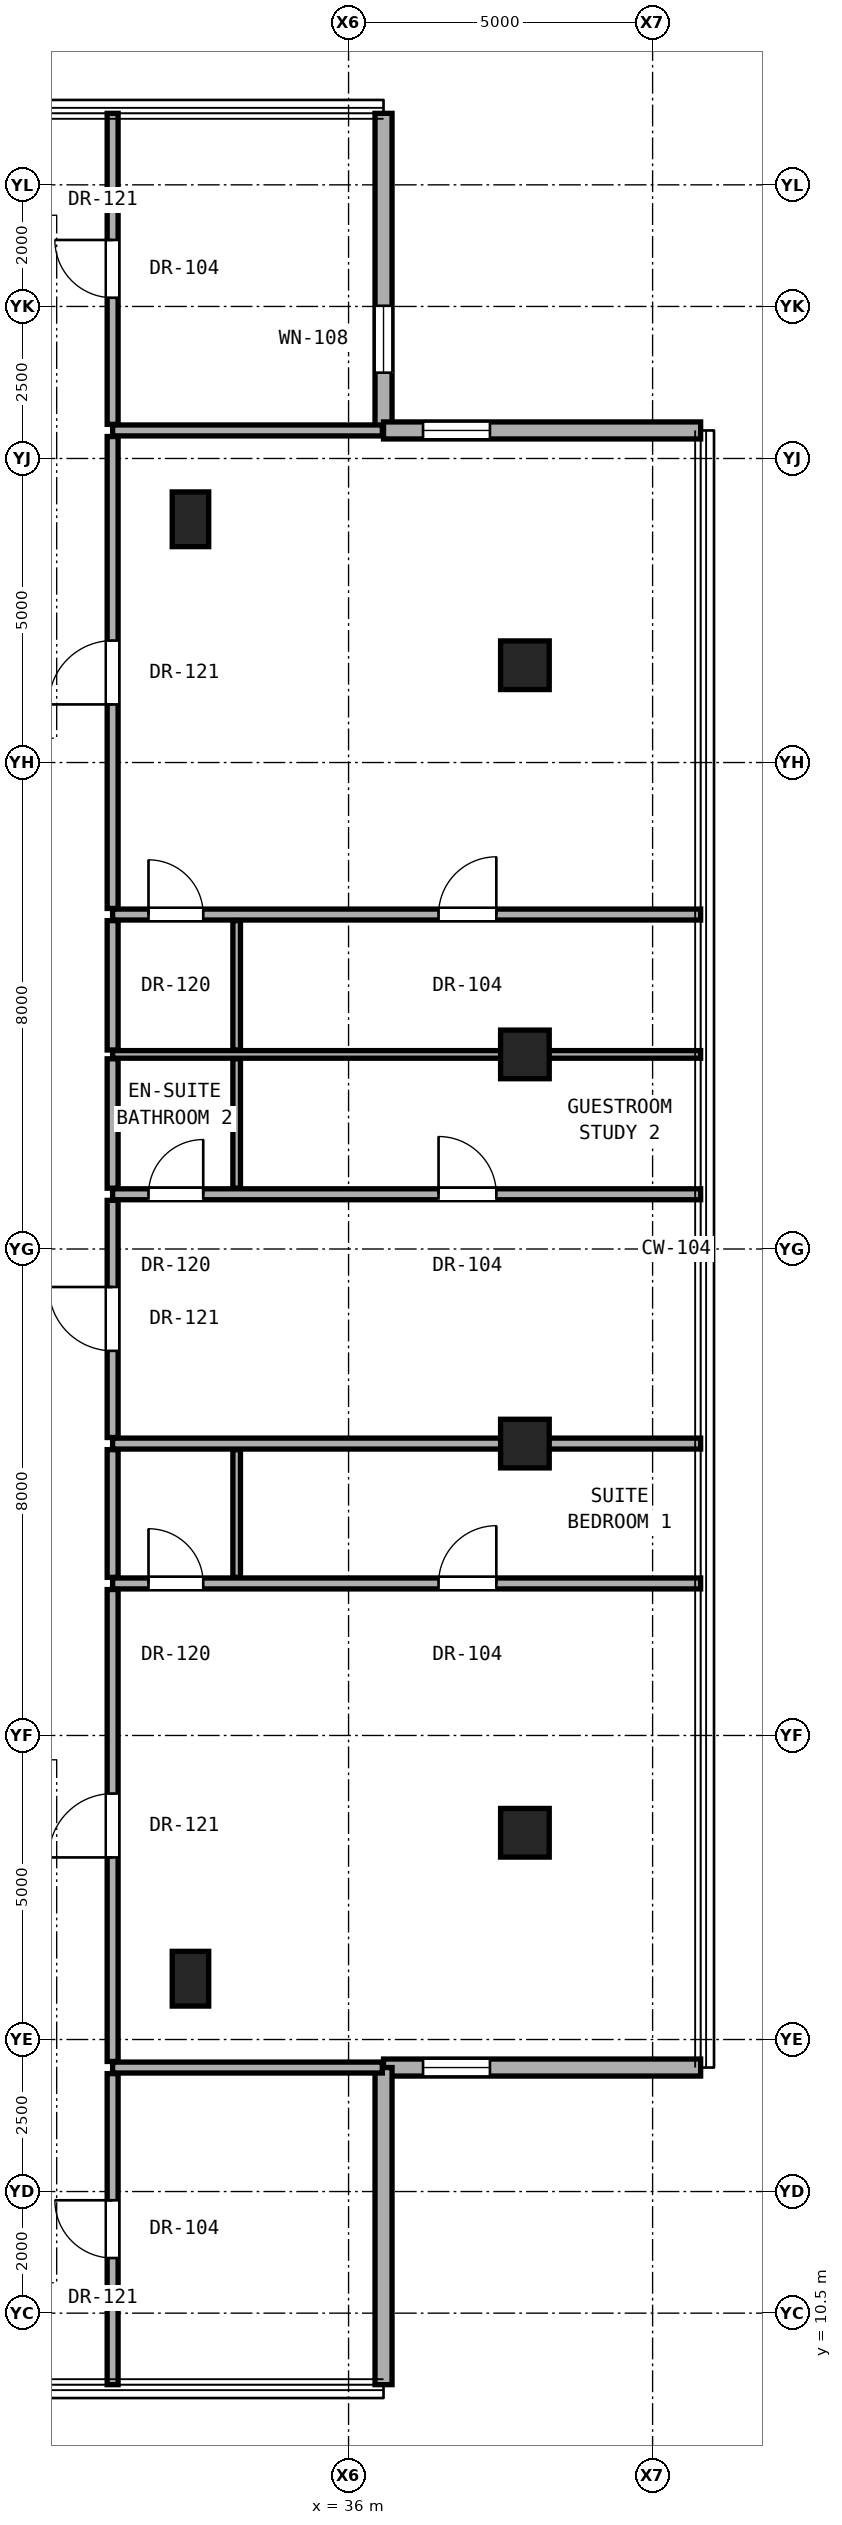
"""IFC4 building model, lengths in metres.
Left out: names, types, materials, properties, quantities, classifications, styles, units other than length and angle.
Written with IfcOpenShell. Run it as: python <this file> out.ifc"""

import sys

from ifc_helpers import new_model, si_unit, direction, frame, frame_2d, origin, origin_2d, place, context, subcontext, project, spatial, rectangle, hollow_rectangle, extrude, element, fill, save


model = new_model("IFC4")
c1 = context("Model", 3, precision=1e-05, world=origin(), true_north=direction((0.0, 1.0)))
c2 = subcontext(c1, "Body", "Model", "MODEL_VIEW")
j1 = project(units=[si_unit("LENGTHUNIT", "METRE"), si_unit("PLANEANGLEUNIT", "RADIAN")], contexts=[c1])
p1 = place(None, origin())
s1 = spatial("IfcSite", under=j1, at=p1, CompositionType="ELEMENT")
p2 = place(p1, origin())
s2 = spatial("IfcBuilding", under=s1, at=p2, CompositionType="ELEMENT")
p3 = place(p2, frame((0.0, 0.0, 206.4)))
s3 = spatial("IfcBuildingStorey", under=s2, at=p3, CompositionType="ELEMENT", Elevation=206.4)
for number, where, z_axis, x_axis in (
    (1, (38.9, 18.4, 0.0), (0.0, 0.0, 1.0), (1.0, 0.0, 0.0)),
    (2, (38.9, 24.8, 0.0), (0.0, 0.0, 1.0), (1.0, 0.0, 0.0)),
    (3, (38.9, 31.2, 0.0), (0.0, 0.0, 1.0), (1.0, 0.0, 0.0)),
    (4, (38.9, 37.6, 0.0), (0.0, 0.0, 1.0), (1.0, 0.0, 0.0)),
):
    element("IfcColumn", number, at=place(p3, frame(where, z_axis=z_axis, x_axis=x_axis)), inside=s3, PredefinedType="COLUMN", context=c2, shape_type="SweptSolid", body=[
        extrude(hollow_rectangle(XDim=0.8, YDim=0.8, WallThickness=0.045, at=origin_2d()), origin(), (0.0, 0.0, 1.0), 3.25),
    ])
for number, where, z_axis, x_axis in (
    (5, (33.4, 16.0, 0.0), (0.0, 0.0, 1.0), (1.0, 0.0, 0.0)),
    (6, (33.4, 40.0, 0.0), (0.0, 0.0, 1.0), (1.0, 0.0, 0.0)),
):
    element("IfcColumn", number, at=place(p3, frame(where, z_axis=z_axis, x_axis=x_axis)), inside=s3, PredefinedType="PILASTER", context=c2, shape_type="SweptSolid", body=[
        extrude(rectangle(XDim=0.6, YDim=0.9, at=origin_2d()), origin(), (0.0, 0.0, 1.0), 3.25),
    ])
p4 = place(p3, frame((36.575, 41.461, 0.0), z_axis=(0.0, 0.0, 1.0), x_axis=(0.0, 1.0, 0.0)))
e7 = element("IfcWall", 7, at=p4, inside=s3, PredefinedType="SOLIDWALL", context=c2, shape_type="SweptSolid", body=[
    extrude(rectangle(XDim=5.215, YDim=0.28, at=frame_2d((2.607, 0.0))), origin(), (0.0, 0.0, 1.0), 3.03),
])
p5 = place(p4, frame((0.95, 0.0, 0.85)))
e8 = element("IfcOpeningElement", 8, at=p5, cuts=e7, PredefinedType="OPENING", context=c2, shape_type="SweptSolid", body=[
    extrude(rectangle(XDim=1.1, YDim=2.0, at=frame_2d((0.55, 1.0))), frame((0.0, 0.15, 0.0), z_axis=(0.0, -1.0, 0.0), x_axis=(1.0, 0.0, 0.0)), (0.0, 0.0, 1.0), 0.3),
])
p6 = place(p3, frame((36.575, 14.539, 0.0), z_axis=(0.0, 0.0, 1.0), x_axis=(1.0, 0.0, 0.0)))
e9 = element("IfcWall", 9, at=p6, inside=s3, PredefinedType="SOLIDWALL", context=c2, shape_type="SweptSolid", body=[
    extrude(rectangle(XDim=5.215, YDim=0.28, at=frame_2d((2.607, 0.0))), origin(), (0.0, 0.0, 1.0), 3.03),
])
p7 = place(p6, frame((0.65, 0.0, 0.85)))
e10 = element("IfcOpeningElement", 10, at=p7, cuts=e9, PredefinedType="OPENING", context=c2, shape_type="SweptSolid", body=[
    extrude(rectangle(XDim=1.1, YDim=2.0, at=frame_2d((0.55, 1.0))), frame((0.0, 0.15, 0.0), z_axis=(0.0, -1.0, 0.0), x_axis=(1.0, 0.0, 0.0)), (0.0, 0.0, 1.0), 0.3),
])
p8 = place(p3, frame((36.575, 9.324, 0.0), z_axis=(0.0, 0.0, 1.0), x_axis=(0.0, 1.0, 0.0)))
e11 = element("IfcWall", 11, at=p8, inside=s3, PredefinedType="SOLIDWALL", context=c2, shape_type="SweptSolid", body=[
    extrude(rectangle(XDim=5.215, YDim=0.28, at=frame_2d((2.607, 0.0))), origin(), (0.0, 0.0, 1.0), 3.03),
])
p9 = place(p3, frame((41.79, 41.461, 0.0), z_axis=(0.0, 0.0, 1.0), x_axis=(-1.0, 0.0, 0.0)))
e12 = element("IfcWall", 12, at=p9, inside=s3, PredefinedType="SOLIDWALL", context=c2, shape_type="SweptSolid", body=[
    extrude(rectangle(XDim=5.215, YDim=0.28, at=frame_2d((2.607, 0.0))), origin(), (0.0, 0.0, 1.0), 3.03),
])
p10 = place(p9, frame((3.465, 0.0, 0.85)))
e13 = element("IfcOpeningElement", 13, at=p10, cuts=e12, PredefinedType="OPENING", context=c2, shape_type="SweptSolid", body=[
    extrude(rectangle(XDim=1.1, YDim=2.0, at=frame_2d((0.55, 1.0))), frame((0.0, 0.15, 0.0), z_axis=(0.0, -1.0, 0.0), x_axis=(1.0, 0.0, 0.0)), (0.0, 0.0, 1.0), 0.3),
])
p11 = place(p3, frame((32.12, 14.539, 0.0), z_axis=(0.0, 0.0, 1.0), x_axis=(1.0, 0.0, 0.0)))
e14 = element("IfcWall", 14, at=p11, inside=s3, PredefinedType="PARTITIONING", context=c2, shape_type="SweptSolid", body=[
    extrude(rectangle(XDim=4.435, YDim=0.18, at=frame_2d((2.217, 0.0))), origin(), (0.0, 0.0, 1.0), 3.05),
])
p12 = place(p3, frame((32.12, 22.5, 0.0), z_axis=(0.0, 0.0, 1.0), x_axis=(1.0, 0.0, 0.0)))
e15 = element("IfcWall", 15, at=p12, inside=s3, PredefinedType="PARTITIONING", context=c2, shape_type="SweptSolid", body=[
    extrude(rectangle(XDim=9.67, YDim=0.18, at=frame_2d((4.835, 0.0))), origin(), (0.0, 0.0, 1.0), 2.269),
])
p13 = place(p12, frame((5.36, 0.0, 0.0)))
e16 = element("IfcOpeningElement", 16, at=p13, cuts=e15, PredefinedType="OPENING", context=c2, shape_type="SweptSolid", body=[
    extrude(rectangle(XDim=0.95, YDim=2.15, at=frame_2d((0.475, 1.075))), frame((0.0, 0.1, 0.0), z_axis=(0.0, -1.0, 0.0), x_axis=(1.0, 0.0, 0.0)), (0.0, 0.0, 1.0), 0.2),
])
p14 = place(p12, frame((0.59, 0.0, 0.0)))
e17 = element("IfcOpeningElement", 17, at=p14, cuts=e15, PredefinedType="OPENING", context=c2, shape_type="SweptSolid", body=[
    extrude(rectangle(XDim=0.9, YDim=2.1, at=frame_2d((0.45, 1.05))), frame((0.0, 0.1, 0.0), z_axis=(0.0, -1.0, 0.0), x_axis=(1.0, 0.0, 0.0)), (0.0, 0.0, 1.0), 0.2),
])
p15 = place(p3, frame((32.12, 24.8, 0.0), z_axis=(0.0, 0.0, 1.0), x_axis=(1.0, 0.0, 0.0)))
e18 = element("IfcWall", 18, at=p15, inside=s3, PredefinedType="PARTITIONING", context=c2, shape_type="SweptSolid", body=[
    extrude(rectangle(XDim=9.67, YDim=0.18, at=frame_2d((4.835, 0.0))), origin(), (0.0, 0.0, 1.0), 2.269),
])
p16 = place(p3, frame((32.12, 28.9, 0.0), z_axis=(0.0, 0.0, 1.0), x_axis=(1.0, 0.0, 0.0)))
e19 = element("IfcWall", 19, at=p16, inside=s3, PredefinedType="PARTITIONING", context=c2, shape_type="SweptSolid", body=[
    extrude(rectangle(XDim=9.67, YDim=0.18, at=frame_2d((4.835, 0.0))), origin(), (0.0, 0.0, 1.0), 2.269),
])
p17 = place(p16, frame((5.36, 0.0, 0.0)))
e20 = element("IfcOpeningElement", 20, at=p17, cuts=e19, PredefinedType="OPENING", context=c2, shape_type="SweptSolid", body=[
    extrude(rectangle(XDim=0.95, YDim=2.15, at=frame_2d((0.475, 1.075))), frame((0.0, 0.1, 0.0), z_axis=(0.0, -1.0, 0.0), x_axis=(1.0, 0.0, 0.0)), (0.0, 0.0, 1.0), 0.2),
])
p18 = place(p16, frame((0.59, 0.0, 0.0)))
e21 = element("IfcOpeningElement", 21, at=p18, cuts=e19, PredefinedType="OPENING", context=c2, shape_type="SweptSolid", body=[
    extrude(rectangle(XDim=0.9, YDim=2.1, at=frame_2d((0.45, 1.05))), frame((0.0, 0.1, 0.0), z_axis=(0.0, -1.0, 0.0), x_axis=(1.0, 0.0, 0.0)), (0.0, 0.0, 1.0), 0.2),
])
p19 = place(p3, frame((32.12, 31.2, 0.0), z_axis=(0.0, 0.0, 1.0), x_axis=(1.0, 0.0, 0.0)))
e22 = element("IfcWall", 22, at=p19, inside=s3, PredefinedType="PARTITIONING", context=c2, shape_type="SweptSolid", body=[
    extrude(rectangle(XDim=9.67, YDim=0.125, at=frame_2d((4.835, 0.0))), origin(), (0.0, 0.0, 1.0), 2.269),
])
p20 = place(p3, frame((32.12, 33.5, 0.0), z_axis=(0.0, 0.0, 1.0), x_axis=(1.0, 0.0, 0.0)))
e23 = element("IfcWall", 23, at=p20, inside=s3, PredefinedType="PARTITIONING", context=c2, shape_type="SweptSolid", body=[
    extrude(rectangle(XDim=9.67, YDim=0.18, at=frame_2d((4.835, 0.0))), origin(), (0.0, 0.0, 1.0), 2.269),
])
p21 = place(p20, frame((5.36, 0.0, 0.0)))
e24 = element("IfcOpeningElement", 24, at=p21, cuts=e23, PredefinedType="OPENING", context=c2, shape_type="SweptSolid", body=[
    extrude(rectangle(XDim=0.95, YDim=2.15, at=frame_2d((0.475, 1.075))), frame((0.0, 0.1, 0.0), z_axis=(0.0, -1.0, 0.0), x_axis=(1.0, 0.0, 0.0)), (0.0, 0.0, 1.0), 0.2),
])
p22 = place(p20, frame((0.59, 0.0, 0.0)))
e25 = element("IfcOpeningElement", 25, at=p22, cuts=e23, PredefinedType="OPENING", context=c2, shape_type="SweptSolid", body=[
    extrude(rectangle(XDim=0.9, YDim=2.1, at=frame_2d((0.45, 1.05))), frame((0.0, 0.1, 0.0), z_axis=(0.0, -1.0, 0.0), x_axis=(1.0, 0.0, 0.0)), (0.0, 0.0, 1.0), 0.2),
])
p23 = place(p3, frame((32.12, 41.461, 0.0), z_axis=(0.0, 0.0, 1.0), x_axis=(1.0, 0.0, 0.0)))
e26 = element("IfcWall", 26, at=p23, inside=s3, PredefinedType="PARTITIONING", context=c2, shape_type="SweptSolid", body=[
    extrude(rectangle(XDim=4.435, YDim=0.18, at=frame_2d((2.217, 0.0))), origin(), (0.0, 0.0, 1.0), 3.05),
])
p24 = place(p3, frame((32.12, 9.324, 0.0), z_axis=(0.0, 0.0, 1.0), x_axis=(0.0, 1.0, 0.0)))
e27 = element("IfcWall", 27, at=p24, inside=s3, PredefinedType="PARTITIONING", context=c2, shape_type="SweptSolid", body=[
    extrude(rectangle(XDim=5.115, YDim=0.18, at=frame_2d((2.558, 0.0))), origin(), (0.0, 0.0, 1.0), 3.05),
])
p25 = place(p24, frame((2.083, 0.0, 0.0)))
e28 = element("IfcOpeningElement", 28, at=p25, cuts=e27, PredefinedType="OPENING", context=c2, shape_type="SweptSolid", body=[
    extrude(rectangle(XDim=0.95, YDim=2.15, at=frame_2d((0.475, 1.075))), frame((0.0, 0.1, 0.0), z_axis=(0.0, -1.0, 0.0), x_axis=(1.0, 0.0, 0.0)), (0.0, 0.0, 1.0), 0.2),
])
p26 = place(p3, frame((32.12, 14.639, 0.0), z_axis=(0.0, 0.0, 1.0), x_axis=(0.0, 1.0, 0.0)))
e29 = element("IfcWall", 29, at=p26, inside=s3, PredefinedType="PARTITIONING", context=c2, shape_type="SweptSolid", body=[
    extrude(rectangle(XDim=7.761, YDim=0.18, at=frame_2d((3.88, 0.0))), origin(), (0.0, 0.0, 1.0), 2.442),
])
p27 = place(p26, frame((3.355, 0.0, 0.0)))
e30 = element("IfcOpeningElement", 30, at=p27, cuts=e29, PredefinedType="OPENING", context=c2, shape_type="SweptSolid", body=[
    extrude(rectangle(XDim=1.05, YDim=2.2, at=frame_2d((0.525, 1.1))), frame((0.0, 0.1, 0.0), z_axis=(0.0, -1.0, 0.0), x_axis=(1.0, 0.0, 0.0)), (0.0, 0.0, 1.0), 0.2),
])
p28 = place(p3, frame((32.12, 22.6, 0.0), z_axis=(0.0, 0.0, 1.0), x_axis=(0.0, 1.0, 0.0)))
e31 = element("IfcWall", 31, at=p28, inside=s3, PredefinedType="PARTITIONING", context=c2, shape_type="SweptSolid", body=[
    extrude(rectangle(XDim=2.1, YDim=0.18, at=frame_2d((1.05, 0.0))), origin(), (0.0, 0.0, 1.0), 2.346),
])
p29 = place(p3, frame((32.12, 24.9, 0.0), z_axis=(0.0, 0.0, 1.0), x_axis=(0.0, 1.0, 0.0)))
e32 = element("IfcWall", 32, at=p29, inside=s3, PredefinedType="PARTITIONING", context=c2, shape_type="SweptSolid", body=[
    extrude(rectangle(XDim=3.9, YDim=0.18, at=frame_2d((1.95, 0.0))), origin(), (0.0, 0.0, 1.0), 2.346),
])
p30 = place(p29, frame((1.425, 0.0, 0.0)))
e33 = element("IfcOpeningElement", 33, at=p30, cuts=e32, PredefinedType="OPENING", context=c2, shape_type="SweptSolid", body=[
    extrude(rectangle(XDim=1.05, YDim=2.2, at=frame_2d((0.525, 1.1))), frame((0.0, 0.1, 0.0), z_axis=(0.0, -1.0, 0.0), x_axis=(1.0, 0.0, 0.0)), (0.0, 0.0, 1.0), 0.2),
])
for number, where, z_axis, x_axis in (
    (34, (32.12, 29.0, 0.0), (0.0, 0.0, 1.0), (0.0, 1.0, 0.0)),
    (35, (32.12, 31.272, 0.0), (0.0, 0.0, 1.0), (0.0, 1.0, 0.0)),
):
    element("IfcWall", number, at=place(p3, frame(where, z_axis=z_axis, x_axis=x_axis)), inside=s3, PredefinedType="PARTITIONING", context=c2, shape_type="SweptSolid", body=[
        extrude(rectangle(XDim=2.127, YDim=0.18, at=frame_2d((1.064, 0.0))), origin(), (0.0, 0.0, 1.0), 2.346),
    ])
p31 = place(p3, frame((32.12, 33.6, 0.0), z_axis=(0.0, 0.0, 1.0), x_axis=(0.0, 1.0, 0.0)))
e36 = element("IfcWall", 36, at=p31, inside=s3, PredefinedType="PARTITIONING", context=c2, shape_type="SweptSolid", body=[
    extrude(rectangle(XDim=7.761, YDim=0.18, at=frame_2d((3.88, 0.0))), origin(), (0.0, 0.0, 1.0), 2.442),
])
p32 = place(p31, frame((3.355, 0.0, 0.0)))
e37 = element("IfcOpeningElement", 37, at=p32, cuts=e36, PredefinedType="OPENING", context=c2, shape_type="SweptSolid", body=[
    extrude(rectangle(XDim=1.05, YDim=2.2, at=frame_2d((0.525, 1.1))), frame((0.0, 0.1, 0.0), z_axis=(0.0, -1.0, 0.0), x_axis=(1.0, 0.0, 0.0)), (0.0, 0.0, 1.0), 0.2),
])
p33 = place(p3, frame((32.12, 41.561, 0.0), z_axis=(0.0, 0.0, 1.0), x_axis=(0.0, 1.0, 0.0)))
e38 = element("IfcWall", 38, at=p33, inside=s3, PredefinedType="PARTITIONING", context=c2, shape_type="SweptSolid", body=[
    extrude(rectangle(XDim=5.115, YDim=0.18, at=frame_2d((2.558, 0.0))), origin(), (0.0, 0.0, 1.0), 3.05),
])
p34 = place(p33, frame((2.083, 0.0, 0.0)))
e39 = element("IfcOpeningElement", 39, at=p34, cuts=e38, PredefinedType="OPENING", context=c2, shape_type="SweptSolid", body=[
    extrude(rectangle(XDim=0.95, YDim=2.15, at=frame_2d((0.475, 1.075))), frame((0.0, 0.1, 0.0), z_axis=(0.0, -1.0, 0.0), x_axis=(1.0, 0.0, 0.0)), (0.0, 0.0, 1.0), 0.2),
])
p35 = place(p3, frame((34.16, 22.6, 0.0), z_axis=(0.0, 0.0, 1.0), x_axis=(0.0, 1.0, 0.0)))
e40 = element("IfcWall", 40, at=p35, inside=s3, PredefinedType="PARTITIONING", context=c2, shape_type="SweptSolid", body=[
    extrude(rectangle(XDim=2.1, YDim=0.125, at=frame_2d((1.05, 0.0))), origin(), (0.0, 0.0, 1.0), 2.346),
])
for number, where, z_axis, x_axis in (
    (41, (34.16, 29.0, 0.0), (0.0, 0.0, 1.0), (0.0, 1.0, 0.0)),
    (42, (34.16, 31.272, 0.0), (0.0, 0.0, 1.0), (0.0, 1.0, 0.0)),
):
    element("IfcWall", number, at=place(p3, frame(where, z_axis=z_axis, x_axis=x_axis)), inside=s3, PredefinedType="PARTITIONING", context=c2, shape_type="SweptSolid", body=[
        extrude(rectangle(XDim=2.127, YDim=0.125, at=frame_2d((1.064, 0.0))), origin(), (0.0, 0.0, 1.0), 2.346),
    ])
p36 = place(p5, origin())
e43 = element("IfcWindow", 43, at=p36, inside=s3, PartitioningType="SINGLE_PANEL", PredefinedType="WINDOW", context=c2, shape_type="SweptSolid", body=[
    extrude(rectangle(XDim=1.1, YDim=2.0, at=frame_2d((0.55, 1.0))), frame((0.0, 0.03, 0.0), z_axis=(0.0, -1.0, 0.0), x_axis=(1.0, 0.0, 0.0)), (0.0, 0.0, 1.0), 0.06),
])
fill(e8, e43)
p37 = place(p7, origin())
e44 = element("IfcWindow", 44, at=p37, inside=s3, PartitioningType="SINGLE_PANEL", PredefinedType="WINDOW", context=c2, shape_type="SweptSolid", body=[
    extrude(rectangle(XDim=1.1, YDim=2.0, at=frame_2d((0.55, 1.0))), frame((0.0, 0.03, 0.0), z_axis=(0.0, -1.0, 0.0), x_axis=(1.0, 0.0, 0.0)), (0.0, 0.0, 1.0), 0.06),
])
fill(e10, e44)
p38 = place(p10, origin())
e45 = element("IfcWindow", 45, at=p38, inside=s3, PartitioningType="SINGLE_PANEL", PredefinedType="WINDOW", context=c2, shape_type="SweptSolid", body=[
    extrude(rectangle(XDim=1.1, YDim=2.0, at=frame_2d((0.55, 1.0))), frame((0.0, 0.03, 0.0), z_axis=(0.0, -1.0, 0.0), x_axis=(1.0, 0.0, 0.0)), (0.0, 0.0, 1.0), 0.06),
])
fill(e13, e45)
p39 = place(p27, origin())
e46 = element("IfcDoor", 46, at=p39, inside=s3, OperationType="SINGLE_SWING_LEFT", PredefinedType="DOOR", context=c2, shape_type="SweptSolid", body=[
    extrude(rectangle(XDim=1.05, YDim=2.2, at=frame_2d((0.525, 1.1))), frame((0.0, 0.025, 0.0), z_axis=(0.0, -1.0, 0.0), x_axis=(1.0, 0.0, 0.0)), (0.0, 0.0, 1.0), 0.05),
])
fill(e30, e46)
p40 = place(p13, origin())
e47 = element("IfcDoor", 47, at=p40, inside=s3, OperationType="SINGLE_SWING_RIGHT", PredefinedType="DOOR", context=c2, shape_type="SweptSolid", body=[
    extrude(rectangle(XDim=0.95, YDim=2.15, at=frame_2d((0.475, 1.075))), frame((0.0, 0.025, 0.0), z_axis=(0.0, -1.0, 0.0), x_axis=(1.0, 0.0, 0.0)), (0.0, 0.0, 1.0), 0.05),
])
fill(e16, e47)
p41 = place(p14, origin())
e48 = element("IfcDoor", 48, at=p41, inside=s3, OperationType="SINGLE_SWING_LEFT", PredefinedType="DOOR", context=c2, shape_type="SweptSolid", body=[
    extrude(rectangle(XDim=0.9, YDim=2.1, at=frame_2d((0.45, 1.05))), frame((0.0, 0.025, 0.0), z_axis=(0.0, -1.0, 0.0), x_axis=(1.0, 0.0, 0.0)), (0.0, 0.0, 1.0), 0.05),
])
fill(e17, e48)
p42 = place(p30, origin())
e49 = element("IfcDoor", 49, at=p42, inside=s3, OperationType="SINGLE_SWING_RIGHT", PredefinedType="DOOR", context=c2, shape_type="SweptSolid", body=[
    extrude(rectangle(XDim=1.05, YDim=2.2, at=frame_2d((0.525, 1.1))), frame((0.0, 0.025, 0.0), z_axis=(0.0, -1.0, 0.0), x_axis=(1.0, 0.0, 0.0)), (0.0, 0.0, 1.0), 0.05),
])
fill(e33, e49)
p43 = place(p17, origin())
e50 = element("IfcDoor", 50, at=p43, inside=s3, OperationType="SINGLE_SWING_LEFT", PredefinedType="DOOR", context=c2, shape_type="SweptSolid", body=[
    extrude(rectangle(XDim=0.95, YDim=2.15, at=frame_2d((0.475, 1.075))), frame((0.0, 0.025, 0.0), z_axis=(0.0, -1.0, 0.0), x_axis=(1.0, 0.0, 0.0)), (0.0, 0.0, 1.0), 0.05),
])
fill(e20, e50)
p44 = place(p18, origin())
e51 = element("IfcDoor", 51, at=p44, inside=s3, OperationType="SINGLE_SWING_RIGHT", PredefinedType="DOOR", context=c2, shape_type="SweptSolid", body=[
    extrude(rectangle(XDim=0.9, YDim=2.1, at=frame_2d((0.45, 1.05))), frame((0.0, 0.025, 0.0), z_axis=(0.0, -1.0, 0.0), x_axis=(1.0, 0.0, 0.0)), (0.0, 0.0, 1.0), 0.05),
])
fill(e21, e51)
p45 = place(p32, origin())
e52 = element("IfcDoor", 52, at=p45, inside=s3, OperationType="SINGLE_SWING_LEFT", PredefinedType="DOOR", context=c2, shape_type="SweptSolid", body=[
    extrude(rectangle(XDim=1.05, YDim=2.2, at=frame_2d((0.525, 1.1))), frame((0.0, 0.025, 0.0), z_axis=(0.0, -1.0, 0.0), x_axis=(1.0, 0.0, 0.0)), (0.0, 0.0, 1.0), 0.05),
])
fill(e37, e52)
p46 = place(p21, origin())
e53 = element("IfcDoor", 53, at=p46, inside=s3, OperationType="SINGLE_SWING_RIGHT", PredefinedType="DOOR", context=c2, shape_type="SweptSolid", body=[
    extrude(rectangle(XDim=0.95, YDim=2.15, at=frame_2d((0.475, 1.075))), frame((0.0, 0.025, 0.0), z_axis=(0.0, -1.0, 0.0), x_axis=(1.0, 0.0, 0.0)), (0.0, 0.0, 1.0), 0.05),
])
fill(e24, e53)
p47 = place(p22, origin())
e54 = element("IfcDoor", 54, at=p47, inside=s3, OperationType="SINGLE_SWING_LEFT", PredefinedType="DOOR", context=c2, shape_type="SweptSolid", body=[
    extrude(rectangle(XDim=0.9, YDim=2.1, at=frame_2d((0.45, 1.05))), frame((0.0, 0.025, 0.0), z_axis=(0.0, -1.0, 0.0), x_axis=(1.0, 0.0, 0.0)), (0.0, 0.0, 1.0), 0.05),
])
fill(e25, e54)
p48 = place(p25, origin())
e55 = element("IfcDoor", 55, at=p48, inside=s3, OperationType="SINGLE_SWING_RIGHT", PredefinedType="DOOR", context=c2, shape_type="SweptSolid", body=[
    extrude(rectangle(XDim=0.95, YDim=2.15, at=frame_2d((0.475, 1.075))), frame((0.0, 0.025, 0.0), z_axis=(0.0, -1.0, 0.0), x_axis=(1.0, 0.0, 0.0)), (0.0, 0.0, 1.0), 0.05),
])
fill(e28, e55)
p49 = place(p34, origin())
e56 = element("IfcDoor", 56, at=p49, inside=s3, OperationType="SINGLE_SWING_RIGHT", PredefinedType="DOOR", context=c2, shape_type="SweptSolid", body=[
    extrude(rectangle(XDim=0.95, YDim=2.15, at=frame_2d((0.475, 1.075))), frame((0.0, 0.025, 0.0), z_axis=(0.0, -1.0, 0.0), x_axis=(1.0, 0.0, 0.0)), (0.0, 0.0, 1.0), 0.05),
])
fill(e39, e56)
save(model, sys.argv[1])
